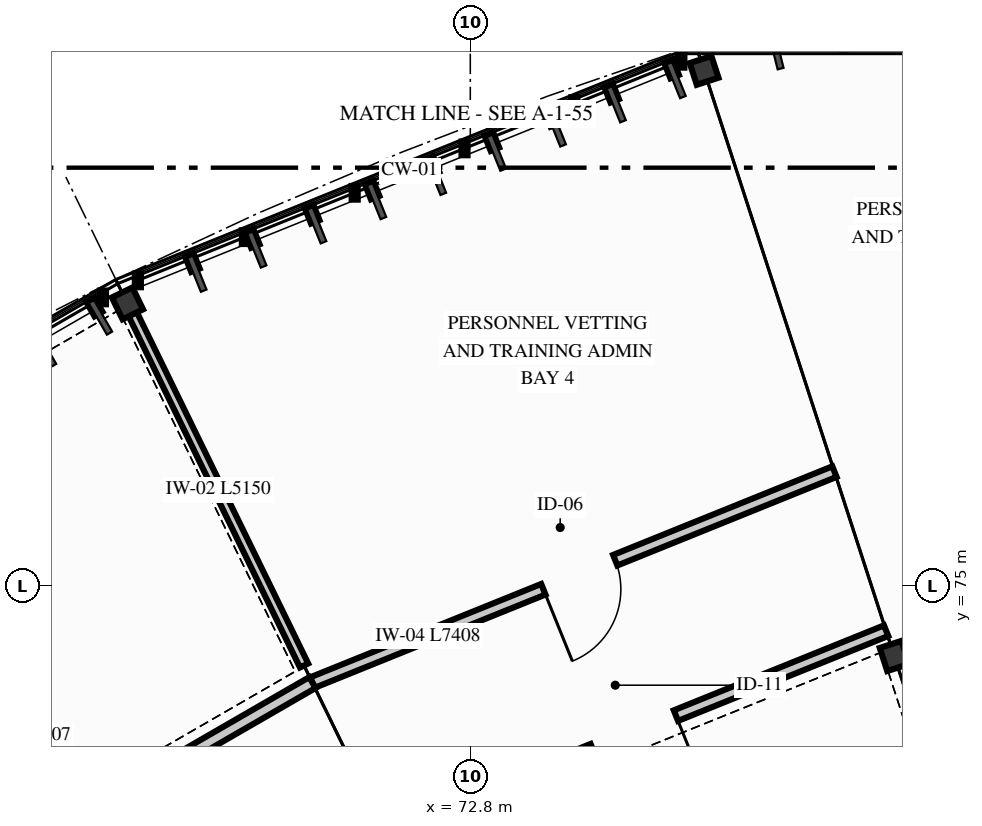
"""IFC4 building model, lengths in metres.
Left out: names, types, materials, properties, quantities, classifications, styles, units other than length and angle.
Written with IfcOpenShell. Run it as: python <this file> out.ifc"""

import sys

from ifc_helpers import new_model, si_unit, direction, frame, frame_2d, origin, origin_2d, place, context, subcontext, project, spatial, rectangle, i_section, extrude, element, fill, save


model = new_model("IFC4")
c1 = context("Model", 3, precision=1e-05, world=origin(), true_north=direction((0.0, 1.0)))
c2 = subcontext(c1, "Body", "Model", "MODEL_VIEW")
j1 = project(units=[si_unit("LENGTHUNIT", "METRE"), si_unit("PLANEANGLEUNIT", "RADIAN")], contexts=[c1])
p1 = place(None, origin())
s1 = spatial("IfcSite", under=j1, at=p1, CompositionType="ELEMENT")
p2 = place(p1, origin())
s2 = spatial("IfcBuilding", under=s1, at=p2, CompositionType="ELEMENT")
p3 = place(p2, frame((0.0, 0.0, 21.6)))
s3 = spatial("IfcBuildingStorey", under=s2, at=p3, CompositionType="ELEMENT", Elevation=21.6)
p4 = place(p3, frame((78.379, 74.076, 0.0), z_axis=(0.0, 0.0, 1.0), x_axis=(0.951056516295, 0.309016994375, 0.0)))
e1 = element("IfcColumn", 1, at=p4, inside=s3, PredefinedType="COLUMN", context=c2, shape_type="SweptSolid", body=[
    extrude(i_section(OverallWidth=0.3, OverallDepth=0.32, WebThickness=0.011, FlangeThickness=0.021, FilletRadius=0.027, at=origin_2d()), origin(), (0.0, 0.0, 1.0), 5.156),
])
p5 = place(p3, frame((75.876, 81.78, 0.0), z_axis=(0.0, 0.0, 1.0), x_axis=(0.951056516295, 0.309016994375, 0.0)))
e2 = element("IfcColumn", 2, at=p5, inside=s3, PredefinedType="COLUMN", context=c2, shape_type="SweptSolid", body=[
    extrude(i_section(OverallWidth=0.3, OverallDepth=0.3, WebThickness=0.011, FlangeThickness=0.019, FilletRadius=0.027, at=origin_2d()), origin(), (0.0, 0.0, 1.0), 4.354),
])
p6 = place(p3, frame((68.29, 78.714, 0.0), z_axis=(0.0, 0.0, 1.0), x_axis=(0.898794046299, 0.438371146789, 0.0)))
e3 = element("IfcColumn", 3, at=p6, inside=s3, PredefinedType="COLUMN", context=c2, shape_type="SweptSolid", body=[
    extrude(i_section(OverallWidth=0.3, OverallDepth=0.32, WebThickness=0.011, FlangeThickness=0.021, FilletRadius=0.027, at=origin_2d()), origin(), (0.0, 0.0, 1.0), 3.9),
])
p7 = place(p3, frame((78.271, 74.409, 0.0), z_axis=(0.0, 0.0, 1.0), x_axis=(-0.927181218568, -0.374613117677, 0.0)))
e4 = element("IfcWall", 4, at=p7, inside=s3, PredefinedType="PARTITIONING", context=c2, shape_type="SweptSolid", body=[
    extrude(rectangle(XDim=7.101, YDim=0.15, at=frame_2d((3.551, 0.0))), origin(), (0.0, 0.0, 1.0), 3.62),
])
p8 = place(p7, frame((2.983, 0.0, 0.0)))
e5 = element("IfcOpeningElement", 5, at=p8, cuts=e4, PredefinedType="OPENING", context=c2, shape_type="SweptSolid", body=[
    extrude(rectangle(XDim=1.18, YDim=2.24, at=frame_2d((0.59, 1.12))), frame((0.0, 0.085, 0.0), z_axis=(0.0, -1.0, 0.0), x_axis=(1.0, 0.0, 0.0)), (0.0, 0.0, 1.0), 0.17),
])
p9 = place(p3, frame((77.591, 76.501, 0.0), z_axis=(0.0, 0.0, 1.0), x_axis=(-0.927187035022, -0.374598721418, 0.0)))
e6 = element("IfcWall", 6, at=p9, inside=s3, PredefinedType="PARTITIONING", context=c2, shape_type="SweptSolid", body=[
    extrude(rectangle(XDim=7.408, YDim=0.15, at=frame_2d((3.704, 0.0))), origin(), (0.0, 0.0, 1.0), 3.62),
])
p10 = place(p9, frame((3.111, 0.0, 0.0)))
e7 = element("IfcOpeningElement", 7, at=p10, cuts=e6, PredefinedType="OPENING", context=c2, shape_type="SweptSolid", body=[
    extrude(rectangle(XDim=1.02, YDim=2.18, at=frame_2d((0.51, 1.09))), frame((0.0, 0.085, 0.0), z_axis=(0.0, -1.0, 0.0), x_axis=(1.0, 0.0, 0.0)), (0.0, 0.0, 1.0), 0.17),
])
p11 = place(p3, frame((70.613, 73.951, 0.0), z_axis=(0.0, 0.0, 1.0), x_axis=(-0.438355450259, 0.898801701839, 0.0)))
e8 = element("IfcWall", 8, at=p11, inside=s3, PredefinedType="PARTITIONING", context=c2, shape_type="SweptSolid", body=[
    extrude(rectangle(XDim=5.15, YDim=0.12, at=frame_2d((2.575, 0.0))), origin(), (0.0, 0.0, 1.0), 3.19),
])
p12 = place(p3, frame((70.722, 73.726, 0.0), z_axis=(0.0, 0.0, 1.0), x_axis=(-0.866019843608, -0.500009630384, 0.0)))
e9 = element("IfcWall", 9, at=p12, inside=s3, PredefinedType="PARTITIONING", context=c2, shape_type="SweptSolid", body=[
    extrude(rectangle(XDim=7.408, YDim=0.165, at=frame_2d((3.704, 0.0))), origin(), (0.0, 0.0, 1.0), 3.62),
])
p13 = place(p12, frame((3.111, 0.0, 0.0)))
e10 = element("IfcOpeningElement", 10, at=p13, cuts=e9, PredefinedType="OPENING", context=c2, shape_type="SweptSolid", body=[
    extrude(rectangle(XDim=1.05, YDim=2.2, at=frame_2d((0.525, 1.1))), frame((0.0, 0.093, 0.0), z_axis=(0.0, -1.0, 0.0), x_axis=(1.0, 0.0, 0.0)), (0.0, 0.0, 1.0), 0.185),
])
p14 = place(p8, origin())
e11 = element("IfcDoor", 11, at=p14, inside=s3, OperationType="SINGLE_SWING_LEFT", PredefinedType="DOOR", context=c2, shape_type="SweptSolid", body=[
    extrude(rectangle(XDim=1.18, YDim=2.24, at=frame_2d((0.59, 1.12))), frame((0.0, 0.025, 0.0), z_axis=(0.0, -1.0, 0.0), x_axis=(1.0, 0.0, 0.0)), (0.0, 0.0, 1.0), 0.05),
])
fill(e5, e11)
p15 = place(p10, origin())
e12 = element("IfcDoor", 12, at=p15, inside=s3, OperationType="SINGLE_SWING_RIGHT", PredefinedType="DOOR", context=c2, shape_type="SweptSolid", body=[
    extrude(rectangle(XDim=1.02, YDim=2.18, at=frame_2d((0.51, 1.09))), frame((0.0, 0.025, 0.0), z_axis=(0.0, -1.0, 0.0), x_axis=(1.0, 0.0, 0.0)), (0.0, 0.0, 1.0), 0.05),
])
fill(e7, e12)
save(model, sys.argv[1])
